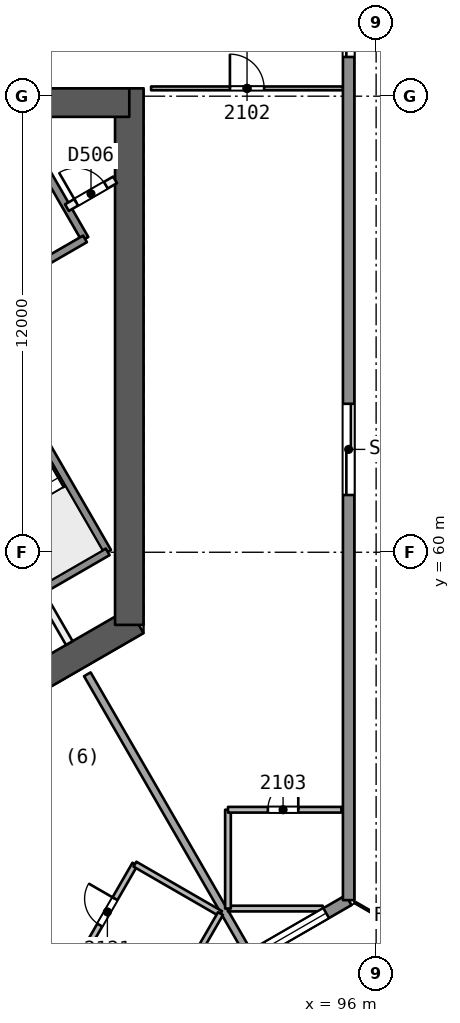
"""IFC4 building model, lengths in metres.
Left out: names, types, materials, properties, quantities, classifications, styles, units other than length and angle.
Written with IfcOpenShell. Run it as: python <this file> out.ifc"""

import sys

from ifc_helpers import new_model, si_unit, direction, frame, frame_2d, origin, place, context, subcontext, project, spatial, rectangle, extrude, element, fill, save


model = new_model("IFC4")
c1 = context("Model", 3, precision=1e-05, world=origin(), true_north=direction((0.0, 1.0)))
c2 = subcontext(c1, "Body", "Model", "MODEL_VIEW")
j1 = project(units=[si_unit("LENGTHUNIT", "METRE"), si_unit("PLANEANGLEUNIT", "RADIAN")], contexts=[c1])
p1 = place(None, origin())
s1 = spatial("IfcSite", under=j1, at=p1, CompositionType="ELEMENT")
p2 = place(p1, origin())
s2 = spatial("IfcBuilding", under=s1, at=p2, CompositionType="ELEMENT")
p3 = place(p2, frame((0.0, 0.0, 90.6)))
s3 = spatial("IfcBuildingStorey", under=s2, at=p3, CompositionType="ELEMENT", Elevation=90.6)
p4 = place(p3, frame((86.723, 56.483, 0.0), z_axis=(0.0, 0.0, 1.0), x_axis=(0.866017201164, 0.500014207086, 0.0)))
e1 = element("IfcWall", 1, at=p4, inside=s3, PredefinedType="SHEAR", context=c2, shape_type="SweptSolid", body=[
    extrude(rectangle(XDim=3.429, YDim=0.75, at=frame_2d((1.714, 0.0))), origin(), (0.0, 0.0, 1.0), 3.7),
])
p5 = place(p3, frame((89.505, 58.089, 0.0), z_axis=(0.0, 0.0, 1.0), x_axis=(0.0, 1.0, 0.0)))
e2 = element("IfcWall", 2, at=p5, inside=s3, PredefinedType="SHEAR", context=c2, shape_type="SweptSolid", body=[
    extrude(rectangle(XDim=14.117, YDim=0.75, at=frame_2d((7.059, 0.0))), origin(), (0.0, 0.0, 1.0), 3.7),
])
p6 = place(p3, frame((89.505, 71.831, 0.0), z_axis=(0.0, 0.0, 1.0), x_axis=(-1.0, 0.0, 0.0)))
e3 = element("IfcWall", 3, at=p6, inside=s3, PredefinedType="SHEAR", context=c2, shape_type="SweptSolid", body=[
    extrude(rectangle(XDim=10.005, YDim=0.75, at=frame_2d((5.002, 0.0))), origin(), (0.0, 0.0, 1.0), 3.7),
])
p7 = place(p6, frame((7.855, 0.0, 0.0)))
e4 = element("IfcOpeningElement", 4, at=p7, cuts=e3, PredefinedType="OPENING", context=c2, shape_type="SweptSolid", body=[
    extrude(rectangle(XDim=1.2, YDim=2.1, at=frame_2d((0.6, 1.05))), frame((0.0, 0.385, 0.0), z_axis=(0.0, -1.0, 0.0), x_axis=(1.0, 0.0, 0.0)), (0.0, 0.0, 1.0), 0.771),
])
p8 = place(p3, frame((90.079, 72.206, 0.0), z_axis=(0.0, 0.0, 1.0), x_axis=(1.0, 0.0, 0.0)))
e5 = element("IfcWall", 5, at=p8, inside=s3, PredefinedType="PARTITIONING", context=c2, shape_type="SweptSolid", body=[
    extrude(rectangle(XDim=5.048, YDim=0.1, at=frame_2d((2.524, 0.0))), origin(), (0.0, 0.0, 1.0), 3.2),
])
p9 = place(p8, frame((2.074, 0.0, 0.0)))
e6 = element("IfcOpeningElement", 6, at=p9, cuts=e5, PredefinedType="OPENING", context=c2, shape_type="SweptSolid", body=[
    extrude(rectangle(XDim=0.9, YDim=2.1, at=frame_2d((0.45, 1.05))), frame((0.0, 0.061, 0.0), z_axis=(0.0, -1.0, 0.0), x_axis=(1.0, 0.0, 0.0)), (0.0, 0.0, 1.0), 0.121),
])
p10 = place(p3, frame((94.595, 50.625, 0.0), z_axis=(0.0, 0.0, 1.0), x_axis=(-1.0, 0.0, 0.0)))
e7 = element("IfcWall", 7, at=p10, inside=s3, PredefinedType="PARTITIONING", context=c2, shape_type="SweptSolid", body=[
    extrude(rectangle(XDim=2.493, YDim=0.15, at=frame_2d((1.247, 0.0))), origin(), (0.0, 0.0, 1.0), 3.2),
])
p11 = place(p3, frame((92.102, 50.625, 0.0), z_axis=(0.0, 0.0, 1.0), x_axis=(0.0, 1.0, 0.0)))
e8 = element("IfcWall", 8, at=p11, inside=s3, PredefinedType="PARTITIONING", context=c2, shape_type="SweptSolid", body=[
    extrude(rectangle(XDim=2.6, YDim=0.15, at=frame_2d((1.3, 0.0))), origin(), (0.0, 0.0, 1.0), 3.2),
])
p12 = place(p3, frame((92.102, 53.225, 0.0), z_axis=(0.0, 0.0, 1.0), x_axis=(1.0, 0.0, 0.0)))
e9 = element("IfcWall", 9, at=p12, inside=s3, PredefinedType="PARTITIONING", context=c2, shape_type="SweptSolid", body=[
    extrude(rectangle(XDim=2.985, YDim=0.15, at=frame_2d((1.493, 0.0))), origin(), (0.0, 0.0, 1.0), 3.2),
])
p13 = place(p12, frame((1.05, 0.0, 0.0)))
e10 = element("IfcOpeningElement", 10, at=p13, cuts=e9, PredefinedType="OPENING", context=c2, shape_type="SweptSolid", body=[
    extrude(rectangle(XDim=0.8, YDim=2.1, at=frame_2d((0.4, 1.05))), frame((0.0, 0.085, 0.0), z_axis=(0.0, -1.0, 0.0), x_axis=(1.0, 0.0, 0.0)), (0.0, 0.0, 1.0), 0.171),
])
p14 = place(p3, frame((88.401, 56.789, 0.0), z_axis=(0.0, 0.0, 1.0), x_axis=(0.500002227119, -0.866024117953, 0.0)))
e11 = element("IfcWall", 11, at=p14, inside=s3, PredefinedType="PARTITIONING", context=c2, shape_type="SweptSolid", body=[
    extrude(rectangle(XDim=8.435, YDim=0.2, at=frame_2d((4.218, 0.0))), origin(), (0.0, 0.0, 1.0), 3.2),
])
p15 = place(p3, frame((88.161, 49.208, 0.0), z_axis=(0.0, 0.0, 1.0), x_axis=(0.500062282582, 0.865989441933, 0.0)))
e12 = element("IfcWall", 12, at=p15, inside=s3, PredefinedType="PARTITIONING", context=c2, shape_type="SweptSolid", body=[
    extrude(rectangle(XDim=2.985, YDim=0.15, at=frame_2d((1.492, 0.0))), origin(), (0.0, 0.0, 1.0), 3.2),
])
p16 = place(p15, frame((1.135, 0.0, 0.0)))
e13 = element("IfcOpeningElement", 13, at=p16, cuts=e12, PredefinedType="OPENING", context=c2, shape_type="SweptSolid", body=[
    extrude(rectangle(XDim=0.8, YDim=2.1, at=frame_2d((0.4, 1.05))), frame((0.0, 0.085, 0.0), z_axis=(0.0, -1.0, 0.0), x_axis=(1.0, 0.0, 0.0)), (0.0, 0.0, 1.0), 0.171),
])
p17 = place(p3, frame((89.654, 51.792, 0.0), z_axis=(0.0, 0.0, 1.0), x_axis=(0.865997922154, -0.500047596559, 0.0)))
e14 = element("IfcWall", 14, at=p17, inside=s3, PredefinedType="PARTITIONING", context=c2, shape_type="SweptSolid", body=[
    extrude(rectangle(XDim=2.6, YDim=0.15, at=frame_2d((1.3, 0.0))), origin(), (0.0, 0.0, 1.0), 3.2),
])
p18 = place(p3, frame((91.905, 50.492, 0.0), z_axis=(0.0, 0.0, 1.0), x_axis=(-0.499960120811, -0.86604842682, 0.0)))
e15 = element("IfcWall", 15, at=p18, inside=s3, PredefinedType="PARTITIONING", context=c2, shape_type="SweptSolid", body=[
    extrude(rectangle(XDim=2.46, YDim=0.15, at=frame_2d((1.23, 0.0))), origin(), (0.0, 0.0, 1.0), 3.2),
])
p19 = place(p3, frame((95.277, 50.846, 0.0), z_axis=(0.0, 0.0, 1.0), x_axis=(-0.866008413041, -0.500029427677, 0.0)))
e16 = element("IfcWall", 16, at=p19, inside=s3, PredefinedType="SOLIDWALL", context=c2, shape_type="SweptSolid", body=[
    extrude(rectangle(XDim=5.967, YDim=0.3, at=frame_2d((2.983, 0.0))), origin(), (0.0, 0.0, 1.0), 3.2),
])
p20 = place(p19, frame((0.682, 0.0, 0.9)))
e17 = element("IfcOpeningElement", 17, at=p20, cuts=e16, PredefinedType="OPENING", context=c2, shape_type="SweptSolid", body=[
    extrude(rectangle(XDim=1.8, YDim=1.5, at=frame_2d((0.9, 0.75))), frame((0.0, 0.161, 0.0), z_axis=(0.0, -1.0, 0.0), x_axis=(1.0, 0.0, 0.0)), (0.0, 0.0, 1.0), 0.321),
])
p21 = place(p19, frame((3.465, 0.0, 0.9)))
e18 = element("IfcOpeningElement", 18, at=p21, cuts=e16, PredefinedType="OPENING", context=c2, shape_type="SweptSolid", body=[
    extrude(rectangle(XDim=1.8, YDim=1.5, at=frame_2d((0.9, 0.75))), frame((0.0, 0.161, 0.0), z_axis=(0.0, -1.0, 0.0), x_axis=(1.0, 0.0, 0.0)), (0.0, 0.0, 1.0), 0.321),
])
p22 = place(p3, frame((95.277, 109.154, 0.0), z_axis=(0.0, 0.0, 1.0), x_axis=(0.0, -1.0, 0.0)))
e19 = element("IfcWall", 19, at=p22, inside=s3, PredefinedType="SOLIDWALL", context=c2, shape_type="SweptSolid", body=[
    extrude(rectangle(XDim=58.307, YDim=0.3, at=frame_2d((29.154, 0.0))), origin(), (0.0, 0.0, 1.0), 3.2),
])
p23 = place(p22, frame((27.954, 0.0, 0.0)))
e20 = element("IfcOpeningElement", 20, at=p23, cuts=e19, PredefinedType="OPENING", context=c2, shape_type="SweptSolid", body=[
    extrude(rectangle(XDim=2.4, YDim=2.4, at=frame_2d((1.2, 1.2))), frame((0.0, 0.161, 0.0), z_axis=(0.0, -1.0, 0.0), x_axis=(1.0, 0.0, 0.0)), (0.0, 0.0, 1.0), 0.321),
])
p24 = place(p22, frame((33.721, 0.0, 0.0)))
e21 = element("IfcOpeningElement", 21, at=p24, cuts=e19, PredefinedType="OPENING", context=c2, shape_type="SweptSolid", body=[
    extrude(rectangle(XDim=2.4, YDim=2.4, at=frame_2d((1.2, 1.2))), frame((0.0, 0.161, 0.0), z_axis=(0.0, -1.0, 0.0), x_axis=(1.0, 0.0, 0.0)), (0.0, 0.0, 1.0), 0.321),
])
p25 = place(p22, frame((45.247, 0.0, 0.0)))
e22 = element("IfcOpeningElement", 22, at=p25, cuts=e19, PredefinedType="OPENING", context=c2, shape_type="SweptSolid", body=[
    extrude(rectangle(XDim=2.4, YDim=2.4, at=frame_2d((1.2, 1.2))), frame((0.0, 0.161, 0.0), z_axis=(0.0, -1.0, 0.0), x_axis=(1.0, 0.0, 0.0)), (0.0, 0.0, 1.0), 0.321),
])
p26 = place(p22, frame((22.186, 0.0, 0.0)))
e23 = element("IfcOpeningElement", 23, at=p26, cuts=e19, PredefinedType="OPENING", context=c2, shape_type="SweptSolid", body=[
    extrude(rectangle(XDim=2.4, YDim=2.4, at=frame_2d((1.2, 1.2))), frame((0.0, 0.161, 0.0), z_axis=(0.0, -1.0, 0.0), x_axis=(1.0, 0.0, 0.0)), (0.0, 0.0, 1.0), 0.321),
])
p27 = place(p22, frame((10.65, 0.0, 0.0)))
e24 = element("IfcOpeningElement", 24, at=p27, cuts=e19, PredefinedType="OPENING", context=c2, shape_type="SweptSolid", body=[
    extrude(rectangle(XDim=2.4, YDim=2.4, at=frame_2d((1.2, 1.2))), frame((0.0, 0.161, 0.0), z_axis=(0.0, -1.0, 0.0), x_axis=(1.0, 0.0, 0.0)), (0.0, 0.0, 1.0), 0.321),
])
p28 = place(p3, frame((90.11, 47.863, 0.0), z_axis=(0.0, 0.0, 1.0), x_axis=(-0.866024236478, 0.500002021829, 0.0)))
e25 = element("IfcWall", 25, at=p28, inside=s3, PredefinedType="SOLIDWALL", context=c2, shape_type="SweptSolid", body=[
    extrude(rectangle(XDim=58.307, YDim=0.3, at=frame_2d((29.154, 0.0))), origin(), (0.0, 0.0, 1.0), 3.2),
])
p29 = place(p28, frame((44.133, 0.0, 0.0)))
e26 = element("IfcOpeningElement", 26, at=p29, cuts=e25, PredefinedType="OPENING", context=c2, shape_type="SweptSolid", body=[
    extrude(rectangle(XDim=2.4, YDim=2.4, at=frame_2d((1.2, 1.2))), frame((0.0, 0.161, 0.0), z_axis=(0.0, -1.0, 0.0), x_axis=(1.0, 0.0, 0.0)), (0.0, 0.0, 1.0), 0.321),
])
p30 = place(p28, frame((22.498, 0.0, 0.0)))
e27 = element("IfcOpeningElement", 27, at=p30, cuts=e25, PredefinedType="OPENING", context=c2, shape_type="SweptSolid", body=[
    extrude(rectangle(XDim=2.4, YDim=2.4, at=frame_2d((1.2, 1.2))), frame((0.0, 0.161, 0.0), z_axis=(0.0, -1.0, 0.0), x_axis=(1.0, 0.0, 0.0)), (0.0, 0.0, 1.0), 0.321),
])
p31 = place(p28, frame((10.65, 0.0, 0.0)))
e28 = element("IfcOpeningElement", 28, at=p31, cuts=e25, PredefinedType="OPENING", context=c2, shape_type="SweptSolid", body=[
    extrude(rectangle(XDim=2.4, YDim=2.4, at=frame_2d((1.2, 1.2))), frame((0.0, 0.161, 0.0), z_axis=(0.0, -1.0, 0.0), x_axis=(1.0, 0.0, 0.0)), (0.0, 0.0, 1.0), 0.321),
])
p32 = place(p28, frame((29.812, 0.0, 0.9)))
e29 = element("IfcOpeningElement", 29, at=p32, cuts=e25, PredefinedType="OPENING", context=c2, shape_type="SweptSolid", body=[
    extrude(rectangle(XDim=1.8, YDim=1.5, at=frame_2d((0.9, 0.75))), frame((0.0, 0.161, 0.0), z_axis=(0.0, -1.0, 0.0), x_axis=(1.0, 0.0, 0.0)), (0.0, 0.0, 1.0), 0.321),
])
p33 = place(p28, frame((26.695, 0.0, 0.9)))
e30 = element("IfcOpeningElement", 30, at=p33, cuts=e25, PredefinedType="OPENING", context=c2, shape_type="SweptSolid", body=[
    extrude(rectangle(XDim=1.8, YDim=1.5, at=frame_2d((0.9, 0.75))), frame((0.0, 0.161, 0.0), z_axis=(0.0, -1.0, 0.0), x_axis=(1.0, 0.0, 0.0)), (0.0, 0.0, 1.0), 0.321),
])
p34 = place(p3, frame((87.09, 59.06, 0.0), z_axis=(0.0, 0.0, 1.0), x_axis=(0.499937194881, -0.866061661301, 0.0)))
e31 = element("IfcWall", 31, at=p34, inside=s3, PredefinedType="PARTITIONING", context=c2, shape_type="SweptSolid", body=[
    extrude(rectangle(XDim=1.673, YDim=0.2, at=frame_2d((0.836, 0.0))), origin(), (0.0, 0.0, 1.0), 3.2),
])
p35 = place(p3, frame((85.087, 66.679, 0.0), z_axis=(0.0, 0.0, 1.0), x_axis=(0.500019787375, -0.866013979237, 0.0)))
e32 = element("IfcWall", 32, at=p35, inside=s3, PredefinedType="SOLIDWALL", context=c2, shape_type="SweptSolid", body=[
    extrude(rectangle(XDim=7.7, YDim=0.2, at=frame_2d((3.85, 0.0))), origin(), (0.0, 0.0, 1.0), 3.2),
])
p36 = place(p35, frame((0.55, 0.0, 0.0)))
e33 = element("IfcOpeningElement", 33, at=p36, cuts=e32, PredefinedType="OPENING", context=c2, shape_type="SweptSolid", body=[
    extrude(rectangle(XDim=1.1, YDim=2.1, at=frame_2d((0.55, 1.05))), frame((0.0, 0.11, 0.0), z_axis=(0.0, -1.0, 0.0), x_axis=(1.0, 0.0, 0.0)), (0.0, 0.0, 1.0), 0.221),
])
p37 = place(p3, frame((86.965, 70.626, 0.0), z_axis=(0.0, 0.0, 1.0), x_axis=(0.499996545922, -0.866027397988, 0.0)))
e34 = element("IfcWall", 34, at=p37, inside=s3, PredefinedType="SOLIDWALL", context=c2, shape_type="SweptSolid", body=[
    extrude(rectangle(XDim=2.75, YDim=0.2, at=frame_2d((1.375, 0.0))), origin(), (0.0, 0.0, 1.0), 3.2),
])
p38 = place(p3, frame((87.865, 69.068, 0.0), z_axis=(0.0, 0.0, 1.0), x_axis=(0.865982457891, 0.500074377092, 0.0)))
e35 = element("IfcWall", 35, at=p38, inside=s3, PredefinedType="PARTITIONING", context=c2, shape_type="SweptSolid", body=[
    extrude(rectangle(XDim=1.461, YDim=0.2, at=frame_2d((0.73, 0.0))), origin(), (0.0, 0.0, 1.0), 3.2),
])
p39 = place(p38, frame((0.281, 0.0, 0.0)))
e36 = element("IfcOpeningElement", 36, at=p39, cuts=e35, PredefinedType="OPENING", context=c2, shape_type="SweptSolid", body=[
    extrude(rectangle(XDim=0.9, YDim=2.1, at=frame_2d((0.45, 1.05))), frame((0.0, 0.11, 0.0), z_axis=(0.0, -1.0, 0.0), x_axis=(1.0, 0.0, 0.0)), (0.0, 0.0, 1.0), 0.221),
])
p40 = place(p3, frame((86.348, 67.095, 0.0), z_axis=(0.0, 0.0, 1.0), x_axis=(0.86602648383, 0.499998129301, 0.0)))
e37 = element("IfcWall", 37, at=p40, inside=s3, PredefinedType="SOLIDWALL", context=c2, shape_type="SweptSolid", body=[
    extrude(rectangle(XDim=2.3, YDim=0.2, at=frame_2d((1.15, 0.0))), origin(), (0.0, 0.0, 1.0), 3.2),
])
p41 = place(p3, frame((85.343, 57.935, 0.0), z_axis=(0.0, 0.0, 1.0), x_axis=(0.866004344652, 0.500036473714, 0.0)))
e38 = element("IfcWall", 38, at=p41, inside=s3, PredefinedType="SOLIDWALL", context=c2, shape_type="SweptSolid", body=[
    extrude(rectangle(XDim=4.15, YDim=0.2, at=frame_2d((2.075, 0.0))), origin(), (0.0, 0.0, 1.0), 3.2),
])
p42 = place(p9, origin())
e39 = element("IfcDoor", 39, at=p42, inside=s3, OperationType="SINGLE_SWING_LEFT", PredefinedType="NOTDEFINED", context=c2, shape_type="SweptSolid", body=[
    extrude(rectangle(XDim=0.9, YDim=2.1, at=frame_2d((0.45, 1.05))), frame((0.0, 0.025, 0.0), z_axis=(0.0, -1.0, 0.0), x_axis=(1.0, 0.0, 0.0)), (0.0, 0.0, 1.0), 0.05),
])
fill(e6, e39)
p43 = place(p13, origin())
e40 = element("IfcDoor", 40, at=p43, inside=s3, OperationType="SINGLE_SWING_RIGHT", PredefinedType="NOTDEFINED", context=c2, shape_type="SweptSolid", body=[
    extrude(rectangle(XDim=0.8, YDim=2.1, at=frame_2d((0.4, 1.05))), frame((0.0, 0.025, 0.0), z_axis=(0.0, -1.0, 0.0), x_axis=(1.0, 0.0, 0.0)), (0.0, 0.0, 1.0), 0.05),
])
fill(e10, e40)
p44 = place(p16, origin())
e41 = element("IfcDoor", 41, at=p44, inside=s3, OperationType="SINGLE_SWING_RIGHT", PredefinedType="NOTDEFINED", context=c2, shape_type="SweptSolid", body=[
    extrude(rectangle(XDim=0.8, YDim=2.1, at=frame_2d((0.4, 1.05))), frame((0.0, 0.025, 0.0), z_axis=(0.0, -1.0, 0.0), x_axis=(1.0, 0.0, 0.0)), (0.0, 0.0, 1.0), 0.05),
])
fill(e13, e41)
p45 = place(p20, origin())
e42 = element("IfcWindow", 42, at=p45, inside=s3, PartitioningType="SINGLE_PANEL", PredefinedType="WINDOW", context=c2, shape_type="SweptSolid", body=[
    extrude(rectangle(XDim=1.8, YDim=1.5, at=frame_2d((0.9, 0.75))), frame((0.0, 0.03, 0.0), z_axis=(0.0, -1.0, 0.0), x_axis=(1.0, 0.0, 0.0)), (0.0, 0.0, 1.0), 0.06),
])
fill(e17, e42)
p46 = place(p24, origin())
e43 = element("IfcDoor", 43, at=p46, inside=s3, OperationType="SLIDING_TO_RIGHT", PredefinedType="NOTDEFINED", context=c2, shape_type="SweptSolid", body=[
    extrude(rectangle(XDim=2.4, YDim=2.4, at=frame_2d((1.2, 1.2))), frame((0.0, 0.025, 0.0), z_axis=(0.0, -1.0, 0.0), x_axis=(1.0, 0.0, 0.0)), (0.0, 0.0, 1.0), 0.05),
])
fill(e21, e43)
p47 = place(p25, origin())
e44 = element("IfcDoor", 44, at=p47, inside=s3, OperationType="SLIDING_TO_LEFT", PredefinedType="NOTDEFINED", context=c2, shape_type="SweptSolid", body=[
    extrude(rectangle(XDim=2.4, YDim=2.4, at=frame_2d((1.2, 1.2))), frame((0.0, 0.025, 0.0), z_axis=(0.0, -1.0, 0.0), x_axis=(1.0, 0.0, 0.0)), (0.0, 0.0, 1.0), 0.05),
])
fill(e22, e44)
p48 = place(p39, origin())
e45 = element("IfcDoor", 45, at=p48, inside=s3, OperationType="SINGLE_SWING_LEFT", PredefinedType="NOTDEFINED", context=c2, shape_type="SweptSolid", body=[
    extrude(rectangle(XDim=0.9, YDim=2.1, at=frame_2d((0.45, 1.05))), frame((0.0, 0.025, 0.0), z_axis=(0.0, -1.0, 0.0), x_axis=(1.0, 0.0, 0.0)), (0.0, 0.0, 1.0), 0.05),
])
fill(e36, e45)
save(model, sys.argv[1])
